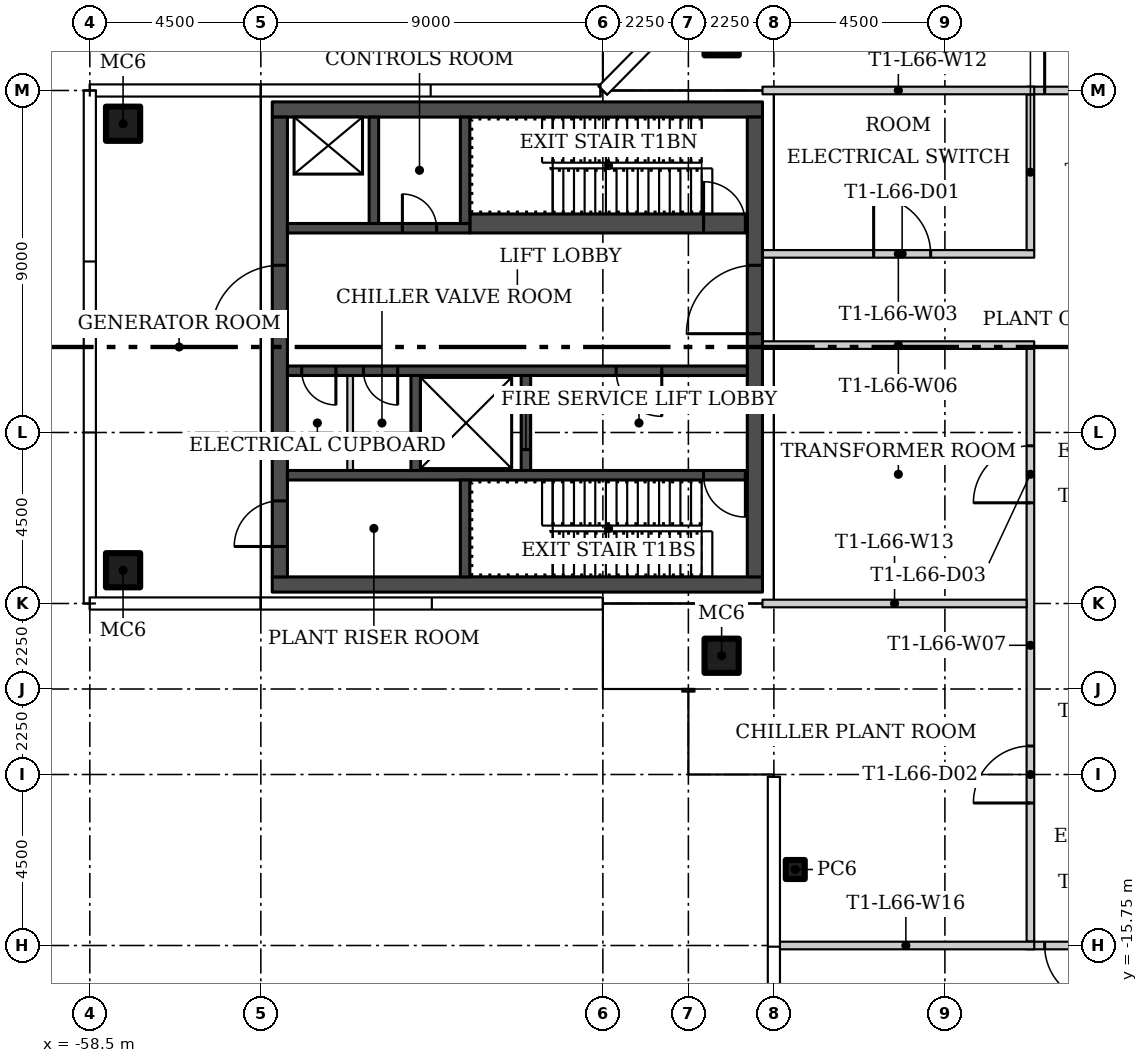
"""IFC4 building model, lengths in metres.
Left out: names, types, materials, properties, quantities, classifications, styles, units other than length and angle.
Written with IfcOpenShell. Run it as: python <this file> out.ifc"""

import sys

from ifc_helpers import new_model, si_unit, direction, frame, frame_2d, origin, origin_2d, place, context, subcontext, project, spatial, rectangle, hollow_rectangle, extrude, element, fill, save


model = new_model("IFC4")
c1 = context("Model", 3, precision=1e-05, world=origin(), true_north=direction((0.0, 1.0)))
c2 = subcontext(c1, "Body", "Model", "MODEL_VIEW")
j1 = project(units=[si_unit("LENGTHUNIT", "METRE"), si_unit("PLANEANGLEUNIT", "RADIAN")], contexts=[c1])
p1 = place(None, origin())
s1 = spatial("IfcSite", under=j1, at=p1, CompositionType="ELEMENT")
p2 = place(p1, origin())
s2 = spatial("IfcBuilding", under=s1, at=p2, CompositionType="ELEMENT")
p3 = place(p2, frame((0.0, 0.0, 273.3)))
s3 = spatial("IfcBuildingStorey", under=s2, at=p3, CompositionType="ELEMENT", Elevation=273.3)
for number, where in (
    (1, (-41.875, 8.125, 0.0)),
    (2, (-41.875, -8.125, 0.0)),
    (3, (-57.625, -5.875, 0.0)),
    (4, (-57.625, 5.875, 0.0)),
):
    element("IfcColumn", number, at=place(p3, frame(where)), inside=s3, PredefinedType="COLUMN", context=c2, shape_type="SweptSolid", body=[
        extrude(hollow_rectangle(XDim=0.9, YDim=0.9, WallThickness=0.036, at=origin_2d()), origin(), (0.0, 0.0, 1.0), 4.55),
    ])
p4 = place(p3, frame((-39.938, -13.75, 0.0)))
e5 = element("IfcColumn", 5, at=p4, inside=s3, PredefinedType="COLUMN", context=c2, shape_type="SweptSolid", body=[
    extrude(hollow_rectangle(XDim=0.5, YDim=0.5, WallThickness=0.016, at=origin_2d()), origin(), (0.0, 0.0, 1.0), 4.55),
])
p5 = place(p3, frame((-40.8, 2.45, 0.0)))
e6 = element("IfcWall", 6, at=p5, inside=s3, PredefinedType="PARTITIONING", context=c2, shape_type="SweptSolid", body=[
    extrude(rectangle(XDim=7.15, YDim=0.2, at=frame_2d((3.575, 0.0))), origin(), (0.0, 0.0, 1.0), 4.55),
])
p6 = place(p5, frame((2.925, 0.0, 0.0)))
e7 = element("IfcOpeningElement", 7, at=p6, cuts=e6, PredefinedType="OPENING", context=c2, shape_type="SweptSolid", body=[
    extrude(rectangle(XDim=1.5, YDim=2.4, at=frame_2d((0.75, 1.2))), frame((0.0, 0.11, 0.0), z_axis=(0.0, -1.0, 0.0), x_axis=(1.0, 0.0, 0.0)), (0.0, 0.0, 1.0), 0.22),
])
p7 = place(p3, frame((-33.65, 0.05, 0.0), z_axis=(0.0, 0.0, 1.0), x_axis=(-1.0, 0.0, 0.0)))
e8 = element("IfcWall", 8, at=p7, inside=s3, PredefinedType="PARTITIONING", context=c2, shape_type="SweptSolid", body=[
    extrude(rectangle(XDim=7.15, YDim=0.2, at=frame_2d((3.575, 0.0))), origin(), (0.0, 0.0, 1.0), 4.55),
])
p8 = place(p3, frame((-33.75, -15.65, 0.0), z_axis=(0.0, 0.0, 1.0), x_axis=(0.0, 1.0, 0.0)))
e9 = element("IfcWall", 9, at=p8, inside=s3, PredefinedType="PARTITIONING", context=c2, shape_type="SweptSolid", body=[
    extrude(rectangle(XDim=15.6, YDim=0.2, at=frame_2d((7.8, 0.0))), origin(), (0.0, 0.0, 1.0), 4.55),
])
p9 = place(p8, frame((3.65, 0.0, 0.0)))
e10 = element("IfcOpeningElement", 10, at=p9, cuts=e9, PredefinedType="OPENING", context=c2, shape_type="SweptSolid", body=[
    extrude(rectangle(XDim=1.5, YDim=2.4, at=frame_2d((0.75, 1.2))), frame((0.0, 0.11, 0.0), z_axis=(0.0, -1.0, 0.0), x_axis=(1.0, 0.0, 0.0)), (0.0, 0.0, 1.0), 0.22),
])
p10 = place(p8, frame((11.55, 0.0, 0.0)))
e11 = element("IfcOpeningElement", 11, at=p10, cuts=e9, PredefinedType="OPENING", context=c2, shape_type="SweptSolid", body=[
    extrude(rectangle(XDim=1.5, YDim=2.4, at=frame_2d((0.75, 1.2))), frame((0.0, 0.11, 0.0), z_axis=(0.0, -1.0, 0.0), x_axis=(1.0, 0.0, 0.0)), (0.0, 0.0, 1.0), 0.22),
])
p11 = place(p3, frame((-33.75, 2.55, 0.0), z_axis=(0.0, 0.0, 1.0), x_axis=(0.0, 1.0, 0.0)))
e12 = element("IfcWall", 12, at=p11, inside=s3, PredefinedType="PARTITIONING", context=c2, shape_type="SweptSolid", body=[
    extrude(rectangle(XDim=4.1, YDim=0.2, at=frame_2d((2.05, 0.0))), origin(), (0.0, 0.0, 1.0), 4.55),
])
p12 = place(p3, frame((-33.85, 6.75, 0.0)))
e13 = element("IfcWall", 13, at=p12, inside=s3, PredefinedType="PARTITIONING", context=c2, shape_type="SweptSolid", body=[
    extrude(rectangle(XDim=2.45, YDim=0.2, at=frame_2d((1.225, 0.0))), origin(), (0.0, 0.0, 1.0), 4.55),
])
p13 = place(p12, frame((0.475, 0.0, 0.0)))
e14 = element("IfcOpeningElement", 14, at=p13, cuts=e13, PredefinedType="OPENING", context=c2, shape_type="SweptSolid", body=[
    extrude(rectangle(XDim=1.5, YDim=2.4, at=frame_2d((0.75, 1.2))), frame((0.0, 0.11, 0.0), z_axis=(0.0, -1.0, 0.0), x_axis=(1.0, 0.0, 0.0)), (0.0, 0.0, 1.0), 0.22),
])
p14 = place(p3, frame((-31.4, -15.75, 0.0), z_axis=(0.0, 0.0, 1.0), x_axis=(-1.0, 0.0, 0.0)))
e15 = element("IfcWall", 15, at=p14, inside=s3, PredefinedType="PARTITIONING", context=c2, shape_type="SweptSolid", body=[
    extrude(rectangle(XDim=2.45, YDim=0.2, at=frame_2d((1.225, 0.0))), origin(), (0.0, 0.0, 1.0), 4.55),
])
p15 = place(p14, frame((0.475, 0.0, 0.0)))
e16 = element("IfcOpeningElement", 16, at=p15, cuts=e15, PredefinedType="OPENING", context=c2, shape_type="SweptSolid", body=[
    extrude(rectangle(XDim=1.5, YDim=2.4, at=frame_2d((0.75, 1.2))), frame((0.0, 0.11, 0.0), z_axis=(0.0, -1.0, 0.0), x_axis=(1.0, 0.0, 0.0)), (0.0, 0.0, 1.0), 0.22),
])
p16 = place(p3, frame((-33.65, 6.75, 0.0), z_axis=(0.0, 0.0, 1.0), x_axis=(-1.0, 0.0, 0.0)))
e17 = element("IfcWall", 17, at=p16, inside=s3, PredefinedType="PARTITIONING", context=c2, shape_type="SweptSolid", body=[
    extrude(rectangle(XDim=7.15, YDim=0.2, at=frame_2d((3.575, 0.0))), origin(), (0.0, 0.0, 1.0), 4.55),
])
p17 = place(p3, frame((-40.8, -6.75, 0.0)))
e18 = element("IfcWall", 18, at=p17, inside=s3, PredefinedType="PARTITIONING", context=c2, shape_type="SweptSolid", body=[
    extrude(rectangle(XDim=6.95, YDim=0.2, at=frame_2d((3.475, 0.0))), origin(), (0.0, 0.0, 1.0), 4.55),
])
p18 = place(p3, frame((-40.405, -15.75, 0.0)))
e19 = element("IfcWall", 19, at=p18, inside=s3, PredefinedType="PARTITIONING", context=c2, shape_type="SweptSolid", body=[
    extrude(rectangle(XDim=6.755, YDim=0.2, at=frame_2d((3.377, 0.0))), origin(), (0.0, 0.0, 1.0), 4.55),
])
for number, where, z_axis, x_axis in (
    (20, (-40.8, -6.25, 0.0), (0.0, 0.0, 1.0), (-1.0, 0.0, 0.0)),
    (21, (-40.8, 6.25, 0.0), (0.0, 0.0, 1.0), (-1.0, 0.0, 0.0)),
):
    element("IfcWall", number, at=place(p3, frame(where, z_axis=z_axis, x_axis=x_axis)), inside=s3, PredefinedType="SHEAR", context=c2, shape_type="SweptSolid", body=[
        extrude(rectangle(XDim=12.9, YDim=0.4, at=frame_2d((6.45, 0.0))), origin(), (0.0, 0.0, 1.0), 4.55),
    ])
p19 = place(p3, frame((-41.0, -6.05, 0.0), z_axis=(0.0, 0.0, 1.0), x_axis=(0.0, 1.0, 0.0)))
e22 = element("IfcWall", 22, at=p19, inside=s3, PredefinedType="SHEAR", context=c2, shape_type="SweptSolid", body=[
    extrude(rectangle(XDim=12.1, YDim=0.4, at=frame_2d((6.05, 0.0))), origin(), (0.0, 0.0, 1.0), 4.55),
])
p20 = place(p19, frame((6.4, 0.0, 0.0)))
e23 = element("IfcOpeningElement", 23, at=p20, cuts=e22, PredefinedType="OPENING", context=c2, shape_type="SweptSolid", body=[
    extrude(rectangle(XDim=1.8, YDim=2.4, at=frame_2d((0.9, 1.2))), frame((0.0, 0.21, 0.0), z_axis=(0.0, -1.0, 0.0), x_axis=(1.0, 0.0, 0.0)), (0.0, 0.0, 1.0), 0.42),
])
p21 = place(p3, frame((-53.5, -6.05, 0.0), z_axis=(0.0, 0.0, 1.0), x_axis=(0.0, 1.0, 0.0)))
e24 = element("IfcWall", 24, at=p21, inside=s3, PredefinedType="SHEAR", context=c2, shape_type="SweptSolid", body=[
    extrude(rectangle(XDim=12.1, YDim=0.4, at=frame_2d((6.05, 0.0))), origin(), (0.0, 0.0, 1.0), 4.55),
])
p22 = place(p21, frame((0.8, 0.0, 0.0)))
e25 = element("IfcOpeningElement", 25, at=p22, cuts=e24, PredefinedType="OPENING", context=c2, shape_type="SweptSolid", body=[
    extrude(rectangle(XDim=1.2, YDim=2.1, at=frame_2d((0.6, 1.05))), frame((0.0, 0.21, 0.0), z_axis=(0.0, -1.0, 0.0), x_axis=(1.0, 0.0, 0.0)), (0.0, 0.0, 1.0), 0.42),
])
p23 = place(p21, frame((6.4, 0.0, 0.0)))
e26 = element("IfcOpeningElement", 26, at=p23, cuts=e24, PredefinedType="OPENING", context=c2, shape_type="SweptSolid", body=[
    extrude(rectangle(XDim=1.8, YDim=2.4, at=frame_2d((0.9, 1.2))), frame((0.0, 0.21, 0.0), z_axis=(0.0, -1.0, 0.0), x_axis=(1.0, 0.0, 0.0)), (0.0, 0.0, 1.0), 0.42),
])
p24 = place(p3, frame((-41.2, -3.375, 0.0), z_axis=(0.0, 0.0, 1.0), x_axis=(-1.0, 0.0, 0.0)))
e27 = element("IfcWall", 27, at=p24, inside=s3, PredefinedType="SHEAR", context=c2, shape_type="SweptSolid", body=[
    extrude(rectangle(XDim=12.1, YDim=0.25, at=frame_2d((6.05, 0.0))), origin(), (0.0, 0.0, 1.0), 4.55),
])
p25 = place(p24, frame((0.05, 0.0, 0.0)))
e28 = element("IfcOpeningElement", 28, at=p25, cuts=e27, PredefinedType="OPENING", context=c2, shape_type="SweptSolid", body=[
    extrude(rectangle(XDim=1.1, YDim=2.1, at=frame_2d((0.55, 1.05))), frame((0.0, 0.135, 0.0), z_axis=(0.0, -1.0, 0.0), x_axis=(1.0, 0.0, 0.0)), (0.0, 0.0, 1.0), 0.27),
])
p26 = place(p3, frame((-48.625, -6.05, 0.0), z_axis=(0.0, 0.0, 1.0), x_axis=(0.0, 1.0, 0.0)))
e29 = element("IfcWall", 29, at=p26, inside=s3, PredefinedType="SHEAR", context=c2, shape_type="SweptSolid", body=[
    extrude(rectangle(XDim=2.55, YDim=0.25, at=frame_2d((1.275, 0.0))), origin(), (0.0, 0.0, 1.0), 4.55),
])
p27 = place(p3, frame((-41.2, -0.625, 0.0), z_axis=(0.0, 0.0, 1.0), x_axis=(-1.0, 0.0, 0.0)))
e30 = element("IfcWall", 30, at=p27, inside=s3, PredefinedType="SHEAR", context=c2, shape_type="SweptSolid", body=[
    extrude(rectangle(XDim=12.1, YDim=0.25, at=frame_2d((6.05, 0.0))), origin(), (0.0, 0.0, 1.0), 4.55),
])
p28 = place(p27, frame((2.25, 0.0, 0.0)))
e31 = element("IfcOpeningElement", 31, at=p28, cuts=e30, PredefinedType="OPENING", context=c2, shape_type="SweptSolid", body=[
    extrude(rectangle(XDim=1.2, YDim=2.1, at=frame_2d((0.6, 1.05))), frame((0.0, 0.135, 0.0), z_axis=(0.0, -1.0, 0.0), x_axis=(1.0, 0.0, 0.0)), (0.0, 0.0, 1.0), 0.27),
])
p29 = place(p27, frame((9.2, 0.0, 0.0)))
e32 = element("IfcOpeningElement", 32, at=p29, cuts=e30, PredefinedType="OPENING", context=c2, shape_type="SweptSolid", body=[
    extrude(rectangle(XDim=0.9, YDim=2.1, at=frame_2d((0.45, 1.05))), frame((0.0, 0.135, 0.0), z_axis=(0.0, -1.0, 0.0), x_axis=(1.0, 0.0, 0.0)), (0.0, 0.0, 1.0), 0.27),
])
p30 = place(p27, frame((10.825, 0.0, 0.0)))
e33 = element("IfcOpeningElement", 33, at=p30, cuts=e30, PredefinedType="OPENING", context=c2, shape_type="SweptSolid", body=[
    extrude(rectangle(XDim=0.9, YDim=2.1, at=frame_2d((0.45, 1.05))), frame((0.0, 0.135, 0.0), z_axis=(0.0, -1.0, 0.0), x_axis=(1.0, 0.0, 0.0)), (0.0, 0.0, 1.0), 0.27),
])
p31 = place(p3, frame((-47.025, -3.25, 0.0), z_axis=(0.0, 0.0, 1.0), x_axis=(0.0, 1.0, 0.0)))
e34 = element("IfcWall", 34, at=p31, inside=s3, PredefinedType="SHEAR", context=c2, shape_type="SweptSolid", body=[
    extrude(rectangle(XDim=2.5, YDim=0.25, at=frame_2d((1.25, 0.0))), origin(), (0.0, 0.0, 1.0), 4.55),
])
p32 = place(p31, frame((0.55, 0.0, 0.0)))
e35 = element("IfcOpeningElement", 35, at=p32, cuts=e34, PredefinedType="OPENING", context=c2, shape_type="SweptSolid", body=[
    extrude(rectangle(XDim=1.4, YDim=2.4, at=frame_2d((0.7, 1.2))), frame((0.0, 0.135, 0.0), z_axis=(0.0, -1.0, 0.0), x_axis=(1.0, 0.0, 0.0)), (0.0, 0.0, 1.0), 0.27),
])
p33 = place(p3, frame((-49.925, -3.25, 0.0), z_axis=(0.0, 0.0, 1.0), x_axis=(0.0, 1.0, 0.0)))
e36 = element("IfcWall", 36, at=p33, inside=s3, PredefinedType="SHEAR", context=c2, shape_type="SweptSolid", body=[
    extrude(rectangle(XDim=2.5, YDim=0.25, at=frame_2d((1.25, 0.0))), origin(), (0.0, 0.0, 1.0), 4.55),
])
p34 = place(p3, frame((-51.65, -3.25, 0.0), z_axis=(0.0, 0.0, 1.0), x_axis=(0.0, 1.0, 0.0)))
e37 = element("IfcWall", 37, at=p34, inside=s3, PredefinedType="PARTITIONING", context=c2, shape_type="SweptSolid", body=[
    extrude(rectangle(XDim=2.5, YDim=0.15, at=frame_2d((1.25, 0.0))), origin(), (0.0, 0.0, 1.0), 4.55),
])
p35 = place(p3, frame((-48.5, 3.25, 0.0)))
e38 = element("IfcWall", 38, at=p35, inside=s3, PredefinedType="SHEAR", context=c2, shape_type="SweptSolid", body=[
    extrude(rectangle(XDim=7.3, YDim=0.5, at=frame_2d((3.65, 0.0))), origin(), (0.0, 0.0, 1.0), 4.55),
])
p36 = place(p35, frame((6.15, 0.0, 0.0)))
e39 = element("IfcOpeningElement", 39, at=p36, cuts=e38, PredefinedType="OPENING", context=c2, shape_type="SweptSolid", body=[
    extrude(rectangle(XDim=1.1, YDim=2.1, at=frame_2d((0.55, 1.05))), frame((0.0, 0.26, 0.0), z_axis=(0.0, -1.0, 0.0), x_axis=(1.0, 0.0, 0.0)), (0.0, 0.0, 1.0), 0.52),
])
p37 = place(p3, frame((-53.3, 3.125, 0.0)))
e40 = element("IfcWall", 40, at=p37, inside=s3, PredefinedType="SHEAR", context=c2, shape_type="SweptSolid", body=[
    extrude(rectangle(XDim=4.8, YDim=0.25, at=frame_2d((2.4, 0.0))), origin(), (0.0, 0.0, 1.0), 4.55),
])
p38 = place(p37, frame((3.025, 0.0, 0.0)))
e41 = element("IfcOpeningElement", 41, at=p38, cuts=e40, PredefinedType="OPENING", context=c2, shape_type="SweptSolid", body=[
    extrude(rectangle(XDim=0.9, YDim=2.1, at=frame_2d((0.45, 1.05))), frame((0.0, 0.135, 0.0), z_axis=(0.0, -1.0, 0.0), x_axis=(1.0, 0.0, 0.0)), (0.0, 0.0, 1.0), 0.27),
])
for number, where, z_axis, x_axis in (
    (42, (-48.625, 3.25, 0.0), (0.0, 0.0, 1.0), (0.0, 1.0, 0.0)),
    (43, (-51.025, 3.25, 0.0), (0.0, 0.0, 1.0), (0.0, 1.0, 0.0)),
):
    element("IfcWall", number, at=place(p3, frame(where, z_axis=z_axis, x_axis=x_axis)), inside=s3, PredefinedType="SHEAR", context=c2, shape_type="SweptSolid", body=[
        extrude(rectangle(XDim=2.8, YDim=0.25, at=frame_2d((1.4, 0.0))), origin(), (0.0, 0.0, 1.0), 4.55),
    ])
p39 = place(p6, origin())
e44 = element("IfcDoor", 44, at=p39, inside=s3, OperationType="DOUBLE_DOOR_SINGLE_SWING", PredefinedType="DOOR", context=c2, shape_type="SweptSolid", body=[
    extrude(rectangle(XDim=1.5, YDim=2.4, at=frame_2d((0.75, 1.2))), frame((0.0, 0.025, 0.0), z_axis=(0.0, -1.0, 0.0), x_axis=(1.0, 0.0, 0.0)), (0.0, 0.0, 1.0), 0.05),
])
fill(e7, e44)
p40 = place(p9, origin())
e45 = element("IfcDoor", 45, at=p40, inside=s3, OperationType="DOUBLE_DOOR_SINGLE_SWING", PredefinedType="DOOR", context=c2, shape_type="SweptSolid", body=[
    extrude(rectangle(XDim=1.5, YDim=2.4, at=frame_2d((0.75, 1.2))), frame((0.0, 0.025, 0.0), z_axis=(0.0, -1.0, 0.0), x_axis=(1.0, 0.0, 0.0)), (0.0, 0.0, 1.0), 0.05),
])
fill(e10, e45)
p41 = place(p10, origin())
e46 = element("IfcDoor", 46, at=p41, inside=s3, OperationType="DOUBLE_DOOR_SINGLE_SWING", PredefinedType="DOOR", context=c2, shape_type="SweptSolid", body=[
    extrude(rectangle(XDim=1.5, YDim=2.4, at=frame_2d((0.75, 1.2))), frame((0.0, 0.025, 0.0), z_axis=(0.0, -1.0, 0.0), x_axis=(1.0, 0.0, 0.0)), (0.0, 0.0, 1.0), 0.05),
])
fill(e11, e46)
p42 = place(p13, origin())
e47 = element("IfcDoor", 47, at=p42, inside=s3, OperationType="DOUBLE_DOOR_SINGLE_SWING", PredefinedType="DOOR", context=c2, shape_type="SweptSolid", body=[
    extrude(rectangle(XDim=1.5, YDim=2.4, at=frame_2d((0.75, 1.2))), frame((0.0, 0.025, 0.0), z_axis=(0.0, -1.0, 0.0), x_axis=(1.0, 0.0, 0.0)), (0.0, 0.0, 1.0), 0.05),
])
fill(e14, e47)
p43 = place(p15, origin())
e48 = element("IfcDoor", 48, at=p43, inside=s3, OperationType="DOUBLE_DOOR_SINGLE_SWING", PredefinedType="DOOR", context=c2, shape_type="SweptSolid", body=[
    extrude(rectangle(XDim=1.5, YDim=2.4, at=frame_2d((0.75, 1.2))), frame((0.0, 0.025, 0.0), z_axis=(0.0, -1.0, 0.0), x_axis=(1.0, 0.0, 0.0)), (0.0, 0.0, 1.0), 0.05),
])
fill(e16, e48)
p44 = place(p20, origin())
e49 = element("IfcDoor", 49, at=p44, inside=s3, OperationType="DOUBLE_DOOR_SINGLE_SWING", PredefinedType="DOOR", context=c2, shape_type="SweptSolid", body=[
    extrude(rectangle(XDim=1.8, YDim=2.4, at=frame_2d((0.9, 1.2))), frame((0.0, 0.025, 0.0), z_axis=(0.0, -1.0, 0.0), x_axis=(1.0, 0.0, 0.0)), (0.0, 0.0, 1.0), 0.05),
])
fill(e23, e49)
p45 = place(p22, origin())
e50 = element("IfcDoor", 50, at=p45, inside=s3, OperationType="SINGLE_SWING_LEFT", PredefinedType="DOOR", context=c2, shape_type="SweptSolid", body=[
    extrude(rectangle(XDim=1.2, YDim=2.1, at=frame_2d((0.6, 1.05))), frame((0.0, 0.025, 0.0), z_axis=(0.0, -1.0, 0.0), x_axis=(1.0, 0.0, 0.0)), (0.0, 0.0, 1.0), 0.05),
])
fill(e25, e50)
p46 = place(p23, origin())
e51 = element("IfcDoor", 51, at=p46, inside=s3, OperationType="DOUBLE_DOOR_SINGLE_SWING", PredefinedType="DOOR", context=c2, shape_type="SweptSolid", body=[
    extrude(rectangle(XDim=1.8, YDim=2.4, at=frame_2d((0.9, 1.2))), frame((0.0, 0.025, 0.0), z_axis=(0.0, -1.0, 0.0), x_axis=(1.0, 0.0, 0.0)), (0.0, 0.0, 1.0), 0.05),
])
fill(e26, e51)
p47 = place(p25, origin())
e52 = element("IfcDoor", 52, at=p47, inside=s3, OperationType="SINGLE_SWING_LEFT", PredefinedType="DOOR", context=c2, shape_type="SweptSolid", body=[
    extrude(rectangle(XDim=1.1, YDim=2.1, at=frame_2d((0.55, 1.05))), frame((0.0, 0.025, 0.0), z_axis=(0.0, -1.0, 0.0), x_axis=(1.0, 0.0, 0.0)), (0.0, 0.0, 1.0), 0.05),
])
fill(e28, e52)
p48 = place(p28, origin())
e53 = element("IfcDoor", 53, at=p48, inside=s3, OperationType="SINGLE_SWING_LEFT", PredefinedType="DOOR", context=c2, shape_type="SweptSolid", body=[
    extrude(rectangle(XDim=1.2, YDim=2.1, at=frame_2d((0.6, 1.05))), frame((0.0, 0.025, 0.0), z_axis=(0.0, -1.0, 0.0), x_axis=(1.0, 0.0, 0.0)), (0.0, 0.0, 1.0), 0.05),
])
fill(e31, e53)
p49 = place(p29, origin())
e54 = element("IfcDoor", 54, at=p49, inside=s3, OperationType="SINGLE_SWING_RIGHT", PredefinedType="DOOR", context=c2, shape_type="SweptSolid", body=[
    extrude(rectangle(XDim=0.9, YDim=2.1, at=frame_2d((0.45, 1.05))), frame((0.0, 0.025, 0.0), z_axis=(0.0, -1.0, 0.0), x_axis=(1.0, 0.0, 0.0)), (0.0, 0.0, 1.0), 0.05),
])
fill(e32, e54)
p50 = place(p30, origin())
e55 = element("IfcDoor", 55, at=p50, inside=s3, OperationType="SINGLE_SWING_RIGHT", PredefinedType="DOOR", context=c2, shape_type="SweptSolid", body=[
    extrude(rectangle(XDim=0.9, YDim=2.1, at=frame_2d((0.45, 1.05))), frame((0.0, 0.025, 0.0), z_axis=(0.0, -1.0, 0.0), x_axis=(1.0, 0.0, 0.0)), (0.0, 0.0, 1.0), 0.05),
])
fill(e33, e55)
p51 = place(p32, origin())
e56 = element("IfcDoor", 56, at=p51, inside=s3, OperationType="SLIDING_TO_LEFT", PredefinedType="DOOR", context=c2, shape_type="SweptSolid", body=[
    extrude(rectangle(XDim=1.4, YDim=2.4, at=frame_2d((0.7, 1.2))), frame((0.0, 0.025, 0.0), z_axis=(0.0, -1.0, 0.0), x_axis=(1.0, 0.0, 0.0)), (0.0, 0.0, 1.0), 0.05),
])
fill(e35, e56)
p52 = place(p36, origin())
e57 = element("IfcDoor", 57, at=p52, inside=s3, OperationType="SINGLE_SWING_RIGHT", PredefinedType="DOOR", context=c2, shape_type="SweptSolid", body=[
    extrude(rectangle(XDim=1.1, YDim=2.1, at=frame_2d((0.55, 1.05))), frame((0.0, 0.025, 0.0), z_axis=(0.0, -1.0, 0.0), x_axis=(1.0, 0.0, 0.0)), (0.0, 0.0, 1.0), 0.05),
])
fill(e39, e57)
p53 = place(p38, origin())
e58 = element("IfcDoor", 58, at=p53, inside=s3, OperationType="SINGLE_SWING_RIGHT", PredefinedType="DOOR", context=c2, shape_type="SweptSolid", body=[
    extrude(rectangle(XDim=0.9, YDim=2.1, at=frame_2d((0.45, 1.05))), frame((0.0, 0.025, 0.0), z_axis=(0.0, -1.0, 0.0), x_axis=(1.0, 0.0, 0.0)), (0.0, 0.0, 1.0), 0.05),
])
fill(e41, e58)
save(model, sys.argv[1])
